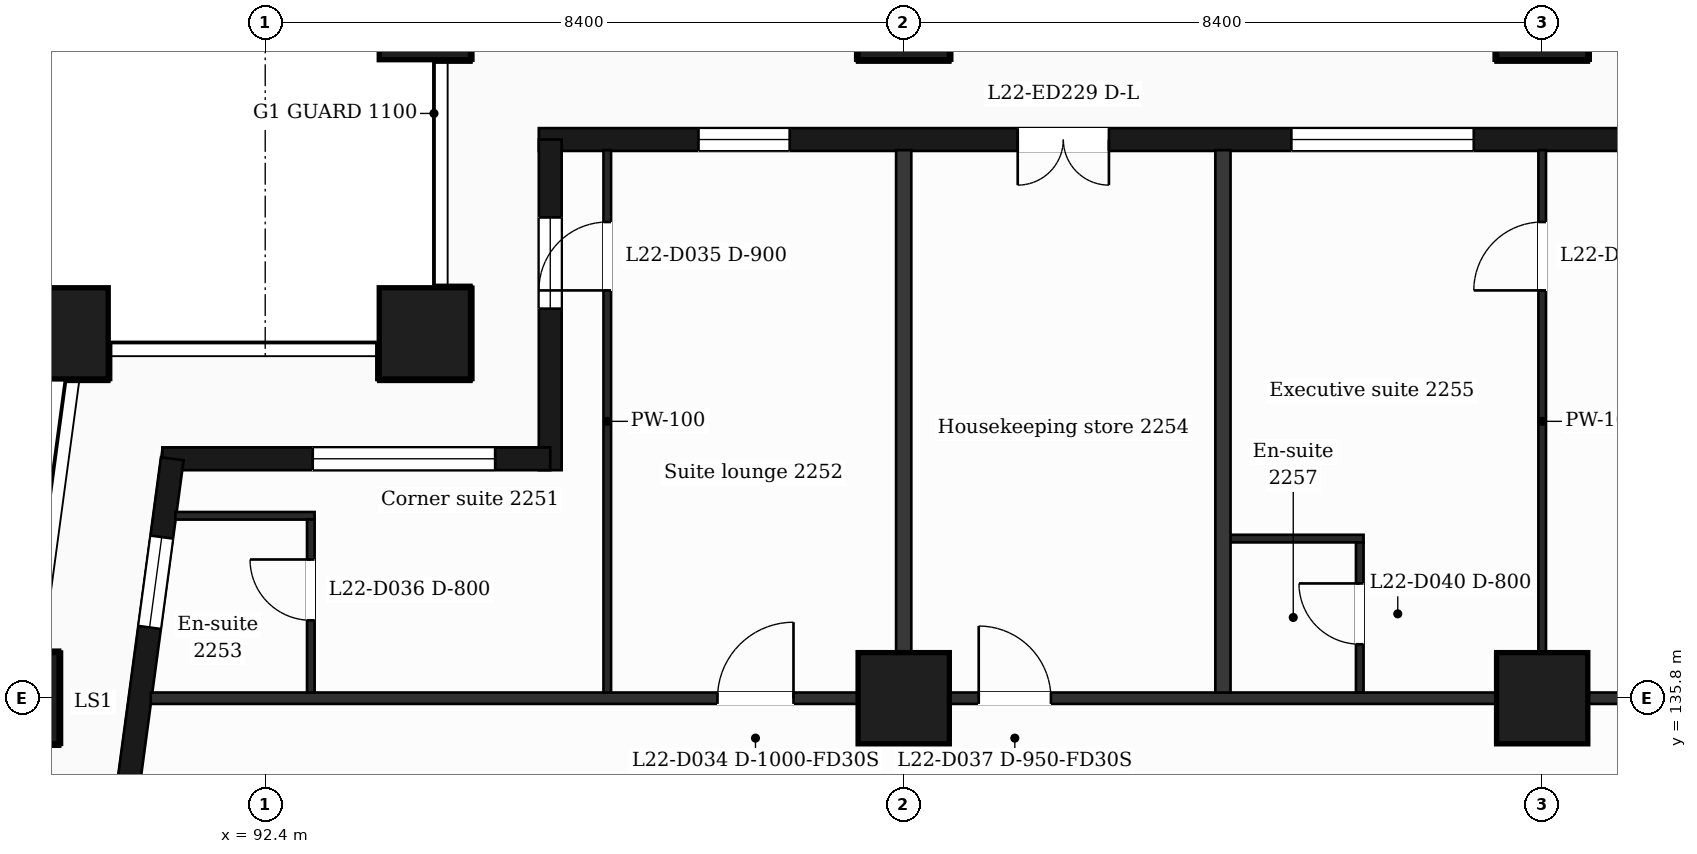
"""IFC4 building model, lengths in metres.
Left out: names, types, materials, properties, quantities, classifications, styles, units other than length and angle.
Written with IfcOpenShell. Run it as: python <this file> out.ifc"""

import sys

from ifc_helpers import new_model, si_unit, direction, frame, frame_2d, origin, origin_2d, place, context, subcontext, project, spatial, rectangle, extrude, element, fill, save


model = new_model("IFC4")
c1 = context("Model", 3, precision=1e-05, world=origin(), true_north=direction((0.0, 1.0)))
c2 = subcontext(c1, "Body", "Model", "MODEL_VIEW")
j1 = project(units=[si_unit("LENGTHUNIT", "METRE"), si_unit("PLANEANGLEUNIT", "RADIAN")], contexts=[c1])
p1 = place(None, origin())
s1 = spatial("IfcSite", under=j1, at=p1, CompositionType="ELEMENT")
p2 = place(p1, origin())
s2 = spatial("IfcBuilding", under=s1, at=p2, CompositionType="ELEMENT")
p3 = place(p2, frame((0.0, 0.0, 98.4)))
s3 = spatial("IfcBuildingStorey", under=s2, at=p3, CompositionType="ELEMENT", Elevation=98.4)
for number, where, z_axis, x_axis in (
    (1, (94.5, 140.6, 0.0), (0.0, 0.0, 1.0), (1.0, 0.0, 0.0)),
    (2, (89.735, 140.6, 0.0), (0.0, 0.0, 1.0), (1.0, 0.0, 0.0)),
    (3, (100.8, 135.8, 0.0), (0.0, 0.0, 1.0), (1.0, 0.0, 0.0)),
    (4, (109.2, 135.8, 0.0), (0.0, 0.0, 1.0), (1.0, 0.0, 0.0)),
    (5, (89.088, 135.8, 0.0), (0.0, 0.0, 1.0), (1.0, 0.0, 0.0)),
    (6, (100.8, 144.8, 0.0), (0.0, 0.0, 1.0), (1.0, 0.0, 0.0)),
    (7, (109.2, 144.8, 0.0), (0.0, 0.0, 1.0), (1.0, 0.0, 0.0)),
    (8, (94.5, 144.8, 0.0), (0.0, 0.0, 1.0), (1.0, 0.0, 0.0)),
):
    element("IfcColumn", number, at=place(p3, frame(where, z_axis=z_axis, x_axis=x_axis)), inside=s3, PredefinedType="COLUMN", context=c2, shape_type="SweptSolid", body=[
        extrude(rectangle(XDim=1.2, YDim=1.2, at=origin_2d()), origin(), (0.0, 0.0, 1.0), 3.7),
    ])
p4 = place(p3, frame((110.4, 143.15, 0.0), z_axis=(0.0, 0.0, 1.0), x_axis=(-1.0, 0.0, 0.0)))
e9 = element("IfcWall", 9, at=p4, inside=s3, PredefinedType="SOLIDWALL", context=c2, shape_type="SweptSolid", body=[
    extrude(rectangle(XDim=14.4, YDim=0.3, at=frame_2d((7.2, 0.0))), origin(), (0.0, 0.0, 1.0), 3.38),
])
p5 = place(p4, frame((2.1, 0.0, 0.9)))
e10 = element("IfcOpeningElement", 10, at=p5, cuts=e9, PredefinedType="OPENING", context=c2, shape_type="SweptSolid", body=[
    extrude(rectangle(XDim=2.4, YDim=2.1, at=frame_2d((1.2, 1.05))), frame((0.0, 0.16, 0.0), z_axis=(0.0, -1.0, 0.0), x_axis=(1.0, 0.0, 0.0)), (0.0, 0.0, 1.0), 0.32),
])
p6 = place(p4, frame((6.9, 0.0, 0.0)))
e11 = element("IfcOpeningElement", 11, at=p6, cuts=e9, PredefinedType="OPENING", context=c2, shape_type="SweptSolid", body=[
    extrude(rectangle(XDim=1.2, YDim=2.4, at=frame_2d((0.6, 1.2))), frame((0.0, 0.16, 0.0), z_axis=(0.0, -1.0, 0.0), x_axis=(1.0, 0.0, 0.0)), (0.0, 0.0, 1.0), 0.32),
])
p7 = place(p4, frame((11.1, 0.0, 0.9)))
e12 = element("IfcOpeningElement", 12, at=p7, cuts=e9, PredefinedType="OPENING", context=c2, shape_type="SweptSolid", body=[
    extrude(rectangle(XDim=1.2, YDim=2.1, at=frame_2d((0.6, 1.05))), frame((0.0, 0.16, 0.0), z_axis=(0.0, -1.0, 0.0), x_axis=(1.0, 0.0, 0.0)), (0.0, 0.0, 1.0), 0.32),
])
p8 = place(p3, frame((96.15, 143.15, 0.0), z_axis=(0.0, 0.0, 1.0), x_axis=(0.0, -1.0, 0.0)))
e13 = element("IfcWall", 13, at=p8, inside=s3, PredefinedType="SOLIDWALL", context=c2, shape_type="SweptSolid", body=[
    extrude(rectangle(XDim=4.35, YDim=0.3, at=frame_2d((2.175, 0.0))), origin(), (0.0, 0.0, 1.0), 3.38),
])
p9 = place(p8, frame((1.025, 0.0, 0.9)))
e14 = element("IfcOpeningElement", 14, at=p9, cuts=e13, PredefinedType="OPENING", context=c2, shape_type="SweptSolid", body=[
    extrude(rectangle(XDim=1.2, YDim=2.1, at=frame_2d((0.6, 1.05))), frame((0.0, 0.16, 0.0), z_axis=(0.0, -1.0, 0.0), x_axis=(1.0, 0.0, 0.0)), (0.0, 0.0, 1.0), 0.32),
])
p10 = place(p3, frame((96.15, 138.95, 0.0), z_axis=(0.0, 0.0, 1.0), x_axis=(-1.0, 0.0, 0.0)))
e15 = element("IfcWall", 15, at=p10, inside=s3, PredefinedType="SOLIDWALL", context=c2, shape_type="SweptSolid", body=[
    extrude(rectangle(XDim=5.104, YDim=0.3, at=frame_2d((2.552, 0.0))), origin(), (0.0, 0.0, 1.0), 3.38),
])
p11 = place(p10, frame((0.725, 0.0, 0.9)))
e16 = element("IfcOpeningElement", 16, at=p11, cuts=e15, PredefinedType="OPENING", context=c2, shape_type="SweptSolid", body=[
    extrude(rectangle(XDim=2.4, YDim=2.1, at=frame_2d((1.2, 1.05))), frame((0.0, 0.16, 0.0), z_axis=(0.0, -1.0, 0.0), x_axis=(1.0, 0.0, 0.0)), (0.0, 0.0, 1.0), 0.32),
])
p12 = place(p3, frame((91.177, 138.95, 0.0), z_axis=(0.0, 0.0, 1.0), x_axis=(-0.133426664613, -0.991058689065, 0.0)))
e17 = element("IfcWall", 17, at=p12, inside=s3, PredefinedType="SOLIDWALL", context=c2, shape_type="SweptSolid", body=[
    extrude(rectangle(XDim=6.609, YDim=0.3, at=frame_2d((3.305, 0.0))), origin(), (0.0, 0.0, 1.0), 3.38),
])
p13 = place(p12, frame((1.039, 0.0, 0.9)))
e18 = element("IfcOpeningElement", 18, at=p13, cuts=e17, PredefinedType="OPENING", context=c2, shape_type="SweptSolid", body=[
    extrude(rectangle(XDim=1.2, YDim=2.1, at=frame_2d((0.6, 1.05))), frame((0.0, 0.16, 0.0), z_axis=(0.0, -1.0, 0.0), x_axis=(1.0, 0.0, 0.0)), (0.0, 0.0, 1.0), 0.32),
])
p14 = place(p12, frame((4.294, 0.0, 0.0)))
e19 = element("IfcOpeningElement", 19, at=p14, cuts=e17, PredefinedType="OPENING", context=c2, shape_type="SweptSolid", body=[
    extrude(rectangle(XDim=1.2, YDim=2.4, at=frame_2d((0.6, 1.2))), frame((0.0, 0.16, 0.0), z_axis=(0.0, -1.0, 0.0), x_axis=(1.0, 0.0, 0.0)), (0.0, 0.0, 1.0), 0.32),
])
p15 = place(p3, frame((90.895, 135.8, 0.0), z_axis=(0.0, 0.0, 1.0), x_axis=(1.0, 0.0, 0.0)))
e20 = element("IfcWall", 20, at=p15, inside=s3, PredefinedType="PARTITIONING", context=c2, shape_type="SweptSolid", body=[
    extrude(rectangle(XDim=45.011, YDim=0.15, at=frame_2d((22.505, 0.0))), origin(), (0.0, 0.0, 1.0), 3.38),
])
p16 = place(p15, frame((7.455, 0.0, 0.0)))
e21 = element("IfcOpeningElement", 21, at=p16, cuts=e20, PredefinedType="OPENING", context=c2, shape_type="SweptSolid", body=[
    extrude(rectangle(XDim=1.0, YDim=2.1, at=frame_2d((0.5, 1.05))), frame((0.0, 0.085, 0.0), z_axis=(0.0, -1.0, 0.0), x_axis=(1.0, 0.0, 0.0)), (0.0, 0.0, 1.0), 0.17),
])
p17 = place(p15, frame((10.892, 0.0, 0.0)))
e22 = element("IfcOpeningElement", 22, at=p17, cuts=e20, PredefinedType="OPENING", context=c2, shape_type="SweptSolid", body=[
    extrude(rectangle(XDim=0.95, YDim=2.1, at=frame_2d((0.475, 1.05))), frame((0.0, 0.085, 0.0), z_axis=(0.0, -1.0, 0.0), x_axis=(1.0, 0.0, 0.0)), (0.0, 0.0, 1.0), 0.17),
])
p18 = place(p15, frame((23.68, 0.0, 0.0)))
e23 = element("IfcOpeningElement", 23, at=p18, cuts=e20, PredefinedType="OPENING", context=c2, shape_type="SweptSolid", body=[
    extrude(rectangle(XDim=1.0, YDim=2.1, at=frame_2d((0.5, 1.05))), frame((0.0, 0.085, 0.0), z_axis=(0.0, -1.0, 0.0), x_axis=(1.0, 0.0, 0.0)), (0.0, 0.0, 1.0), 0.17),
])
p19 = place(p15, frame((30.318, 0.0, 0.0)))
e24 = element("IfcOpeningElement", 24, at=p19, cuts=e20, PredefinedType="OPENING", context=c2, shape_type="SweptSolid", body=[
    extrude(rectangle(XDim=0.95, YDim=2.1, at=frame_2d((0.475, 1.05))), frame((0.0, 0.085, 0.0), z_axis=(0.0, -1.0, 0.0), x_axis=(1.0, 0.0, 0.0)), (0.0, 0.0, 1.0), 0.17),
])
p20 = place(p15, frame((36.355, 0.0, 0.0)))
e25 = element("IfcOpeningElement", 25, at=p20, cuts=e20, PredefinedType="OPENING", context=c2, shape_type="SweptSolid", body=[
    extrude(rectangle(XDim=1.0, YDim=2.1, at=frame_2d((0.5, 1.05))), frame((0.0, 0.085, 0.0), z_axis=(0.0, -1.0, 0.0), x_axis=(1.0, 0.0, 0.0)), (0.0, 0.0, 1.0), 0.17),
])
p21 = place(p3, frame((105.0, 137.9, 0.0), z_axis=(0.0, 0.0, 1.0), x_axis=(1.0, 0.0, 0.0)))
e26 = element("IfcWall", 26, at=p21, inside=s3, PredefinedType="PARTITIONING", context=c2, shape_type="SweptSolid", body=[
    extrude(rectangle(XDim=1.85, YDim=0.1, at=frame_2d((0.925, 0.0))), origin(), (0.0, 0.0, 1.0), 3.38),
])
p22 = place(p3, frame((91.218, 138.2, 0.0), z_axis=(0.0, 0.0, 1.0), x_axis=(1.0, 0.0, 0.0)))
e27 = element("IfcWall", 27, at=p22, inside=s3, PredefinedType="PARTITIONING", context=c2, shape_type="SweptSolid", body=[
    extrude(rectangle(XDim=1.832, YDim=0.1, at=frame_2d((0.916, 0.0))), origin(), (0.0, 0.0, 1.0), 3.38),
])
p23 = place(p3, frame((93.0, 135.875, 0.0), z_axis=(0.0, 0.0, 1.0), x_axis=(0.0, 1.0, 0.0)))
e28 = element("IfcWall", 28, at=p23, inside=s3, PredefinedType="PARTITIONING", context=c2, shape_type="SweptSolid", body=[
    extrude(rectangle(XDim=2.275, YDim=0.1, at=frame_2d((1.137, 0.0))), origin(), (0.0, 0.0, 1.0), 3.38),
])
p24 = place(p23, frame((0.95, 0.0, 0.0)))
e29 = element("IfcOpeningElement", 29, at=p24, cuts=e28, PredefinedType="OPENING", context=c2, shape_type="SweptSolid", body=[
    extrude(rectangle(XDim=0.8, YDim=2.1, at=frame_2d((0.4, 1.05))), frame((0.0, 0.06, 0.0), z_axis=(0.0, -1.0, 0.0), x_axis=(1.0, 0.0, 0.0)), (0.0, 0.0, 1.0), 0.12),
])
p25 = place(p3, frame((96.9, 135.875, 0.0), z_axis=(0.0, 0.0, 1.0), x_axis=(0.0, 1.0, 0.0)))
e30 = element("IfcWall", 30, at=p25, inside=s3, PredefinedType="PARTITIONING", context=c2, shape_type="SweptSolid", body=[
    extrude(rectangle(XDim=7.135, YDim=0.1, at=frame_2d((3.567, 0.0))), origin(), (0.0, 0.0, 1.0), 3.38),
])
p26 = place(p25, frame((5.29, 0.0, 0.0)))
e31 = element("IfcOpeningElement", 31, at=p26, cuts=e30, PredefinedType="OPENING", context=c2, shape_type="SweptSolid", body=[
    extrude(rectangle(XDim=0.9, YDim=2.1, at=frame_2d((0.45, 1.05))), frame((0.0, 0.06, 0.0), z_axis=(0.0, -1.0, 0.0), x_axis=(1.0, 0.0, 0.0)), (0.0, 0.0, 1.0), 0.12),
])
for number, where, z_axis, x_axis in (
    (32, (100.8, 135.875, 0.0), (0.0, 0.0, 1.0), (0.0, 1.0, 0.0)),
    (33, (105.0, 135.875, 0.0), (0.0, 0.0, 1.0), (0.0, 1.0, 0.0)),
):
    element("IfcWall", number, at=place(p3, frame(where, z_axis=z_axis, x_axis=x_axis)), inside=s3, PredefinedType="PARTITIONING", context=c2, shape_type="SweptSolid", body=[
        extrude(rectangle(XDim=7.135, YDim=0.2, at=frame_2d((3.567, 0.0))), origin(), (0.0, 0.0, 1.0), 3.38),
    ])
p27 = place(p3, frame((106.8, 135.875, 0.0), z_axis=(0.0, 0.0, 1.0), x_axis=(0.0, 1.0, 0.0)))
e34 = element("IfcWall", 34, at=p27, inside=s3, PredefinedType="PARTITIONING", context=c2, shape_type="SweptSolid", body=[
    extrude(rectangle(XDim=1.975, YDim=0.1, at=frame_2d((0.988, 0.0))), origin(), (0.0, 0.0, 1.0), 3.38),
])
p28 = place(p27, frame((0.635, 0.0, 0.0)))
e35 = element("IfcOpeningElement", 35, at=p28, cuts=e34, PredefinedType="OPENING", context=c2, shape_type="SweptSolid", body=[
    extrude(rectangle(XDim=0.8, YDim=2.1, at=frame_2d((0.4, 1.05))), frame((0.0, 0.06, 0.0), z_axis=(0.0, -1.0, 0.0), x_axis=(1.0, 0.0, 0.0)), (0.0, 0.0, 1.0), 0.12),
])
p29 = place(p3, frame((109.2, 135.875, 0.0), z_axis=(0.0, 0.0, 1.0), x_axis=(0.0, 1.0, 0.0)))
e36 = element("IfcWall", 36, at=p29, inside=s3, PredefinedType="PARTITIONING", context=c2, shape_type="SweptSolid", body=[
    extrude(rectangle(XDim=7.135, YDim=0.1, at=frame_2d((3.567, 0.0))), origin(), (0.0, 0.0, 1.0), 3.38),
])
p30 = place(p29, frame((5.29, 0.0, 0.0)))
e37 = element("IfcOpeningElement", 37, at=p30, cuts=e36, PredefinedType="OPENING", context=c2, shape_type="SweptSolid", body=[
    extrude(rectangle(XDim=0.9, YDim=2.1, at=frame_2d((0.45, 1.05))), frame((0.0, 0.06, 0.0), z_axis=(0.0, -1.0, 0.0), x_axis=(1.0, 0.0, 0.0)), (0.0, 0.0, 1.0), 0.12),
])
p31 = place(p5, origin())
e38 = element("IfcWindow", 38, at=p31, inside=s3, PartitioningType="SINGLE_PANEL", PredefinedType="WINDOW", context=c2, shape_type="SweptSolid", body=[
    extrude(rectangle(XDim=2.4, YDim=2.1, at=frame_2d((1.2, 1.05))), frame((0.0, 0.03, 0.0), z_axis=(0.0, -1.0, 0.0), x_axis=(1.0, 0.0, 0.0)), (0.0, 0.0, 1.0), 0.06),
])
fill(e10, e38)
p32 = place(p6, origin())
e39 = element("IfcDoor", 39, at=p32, inside=s3, OperationType="DOUBLE_DOOR_SINGLE_SWING", PredefinedType="DOOR", context=c2, shape_type="SweptSolid", body=[
    extrude(rectangle(XDim=1.2, YDim=2.4, at=frame_2d((0.6, 1.2))), frame((0.0, 0.025, 0.0), z_axis=(0.0, -1.0, 0.0), x_axis=(1.0, 0.0, 0.0)), (0.0, 0.0, 1.0), 0.05),
])
fill(e11, e39)
p33 = place(p7, origin())
e40 = element("IfcWindow", 40, at=p33, inside=s3, PartitioningType="SINGLE_PANEL", PredefinedType="WINDOW", context=c2, shape_type="SweptSolid", body=[
    extrude(rectangle(XDim=1.2, YDim=2.1, at=frame_2d((0.6, 1.05))), frame((0.0, 0.03, 0.0), z_axis=(0.0, -1.0, 0.0), x_axis=(1.0, 0.0, 0.0)), (0.0, 0.0, 1.0), 0.06),
])
fill(e12, e40)
p34 = place(p9, origin())
e41 = element("IfcWindow", 41, at=p34, inside=s3, PartitioningType="SINGLE_PANEL", PredefinedType="WINDOW", context=c2, shape_type="SweptSolid", body=[
    extrude(rectangle(XDim=1.2, YDim=2.1, at=frame_2d((0.6, 1.05))), frame((0.0, 0.03, 0.0), z_axis=(0.0, -1.0, 0.0), x_axis=(1.0, 0.0, 0.0)), (0.0, 0.0, 1.0), 0.06),
])
fill(e14, e41)
p35 = place(p11, origin())
e42 = element("IfcWindow", 42, at=p35, inside=s3, PartitioningType="SINGLE_PANEL", PredefinedType="WINDOW", context=c2, shape_type="SweptSolid", body=[
    extrude(rectangle(XDim=2.4, YDim=2.1, at=frame_2d((1.2, 1.05))), frame((0.0, 0.03, 0.0), z_axis=(0.0, -1.0, 0.0), x_axis=(1.0, 0.0, 0.0)), (0.0, 0.0, 1.0), 0.06),
])
fill(e16, e42)
p36 = place(p13, origin())
e43 = element("IfcWindow", 43, at=p36, inside=s3, PartitioningType="SINGLE_PANEL", PredefinedType="WINDOW", context=c2, shape_type="SweptSolid", body=[
    extrude(rectangle(XDim=1.2, YDim=2.1, at=frame_2d((0.6, 1.05))), frame((0.0, 0.03, 0.0), z_axis=(0.0, -1.0, 0.0), x_axis=(1.0, 0.0, 0.0)), (0.0, 0.0, 1.0), 0.06),
])
fill(e18, e43)
p37 = place(p16, origin())
e44 = element("IfcDoor", 44, at=p37, inside=s3, OperationType="SINGLE_SWING_RIGHT", PredefinedType="DOOR", context=c2, shape_type="SweptSolid", body=[
    extrude(rectangle(XDim=1.0, YDim=2.1, at=frame_2d((0.5, 1.05))), frame((0.0, 0.025, 0.0), z_axis=(0.0, -1.0, 0.0), x_axis=(1.0, 0.0, 0.0)), (0.0, 0.0, 1.0), 0.05),
])
fill(e21, e44)
p38 = place(p26, origin())
e45 = element("IfcDoor", 45, at=p38, inside=s3, OperationType="SINGLE_SWING_LEFT", PredefinedType="DOOR", context=c2, shape_type="SweptSolid", body=[
    extrude(rectangle(XDim=0.9, YDim=2.1, at=frame_2d((0.45, 1.05))), frame((0.0, 0.025, 0.0), z_axis=(0.0, -1.0, 0.0), x_axis=(1.0, 0.0, 0.0)), (0.0, 0.0, 1.0), 0.05),
])
fill(e31, e45)
p39 = place(p24, origin())
e46 = element("IfcDoor", 46, at=p39, inside=s3, OperationType="SINGLE_SWING_RIGHT", PredefinedType="DOOR", context=c2, shape_type="SweptSolid", body=[
    extrude(rectangle(XDim=0.8, YDim=2.1, at=frame_2d((0.4, 1.05))), frame((0.0, 0.025, 0.0), z_axis=(0.0, -1.0, 0.0), x_axis=(1.0, 0.0, 0.0)), (0.0, 0.0, 1.0), 0.05),
])
fill(e29, e46)
p40 = place(p17, origin())
e47 = element("IfcDoor", 47, at=p40, inside=s3, OperationType="SINGLE_SWING_LEFT", PredefinedType="DOOR", context=c2, shape_type="SweptSolid", body=[
    extrude(rectangle(XDim=0.95, YDim=2.1, at=frame_2d((0.475, 1.05))), frame((0.0, 0.025, 0.0), z_axis=(0.0, -1.0, 0.0), x_axis=(1.0, 0.0, 0.0)), (0.0, 0.0, 1.0), 0.05),
])
fill(e22, e47)
p41 = place(p30, origin())
e48 = element("IfcDoor", 48, at=p41, inside=s3, OperationType="SINGLE_SWING_LEFT", PredefinedType="DOOR", context=c2, shape_type="SweptSolid", body=[
    extrude(rectangle(XDim=0.9, YDim=2.1, at=frame_2d((0.45, 1.05))), frame((0.0, 0.025, 0.0), z_axis=(0.0, -1.0, 0.0), x_axis=(1.0, 0.0, 0.0)), (0.0, 0.0, 1.0), 0.05),
])
fill(e37, e48)
p42 = place(p28, origin())
e49 = element("IfcDoor", 49, at=p42, inside=s3, OperationType="SINGLE_SWING_RIGHT", PredefinedType="DOOR", context=c2, shape_type="SweptSolid", body=[
    extrude(rectangle(XDim=0.8, YDim=2.1, at=frame_2d((0.4, 1.05))), frame((0.0, 0.025, 0.0), z_axis=(0.0, -1.0, 0.0), x_axis=(1.0, 0.0, 0.0)), (0.0, 0.0, 1.0), 0.05),
])
fill(e35, e49)
save(model, sys.argv[1])
